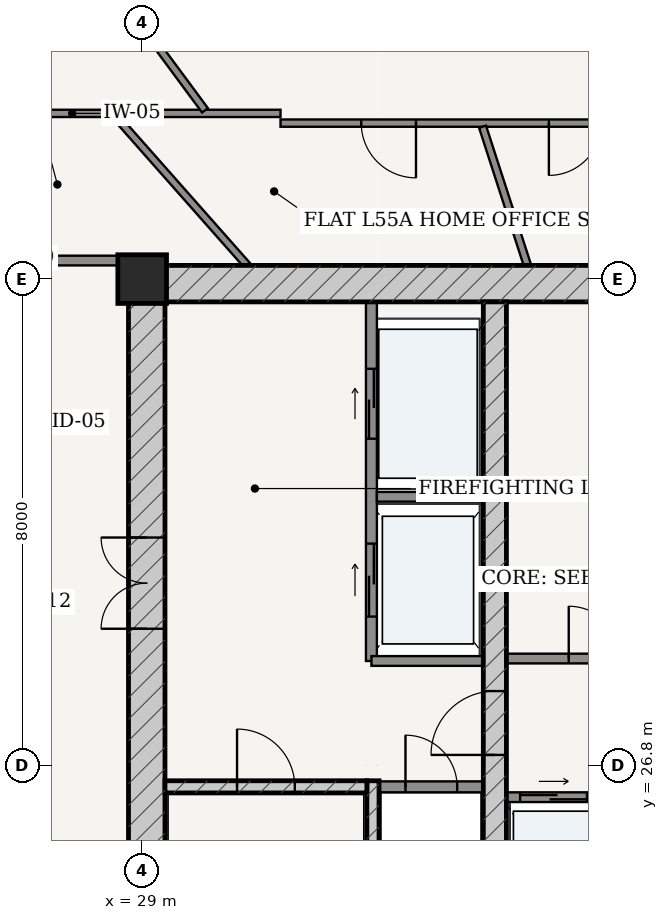
"""IFC4 building model, lengths in metres.
Left out: names, types, materials, properties, quantities, classifications, styles, units other than length and angle.
Written with IfcOpenShell. Run it as: python <this file> out.ifc"""

import sys

from ifc_helpers import new_model, si_unit, direction, frame, frame_2d, origin, origin_2d, place, context, subcontext, project, spatial, rectangle, extrude, source, transform, mapped, element, fill, save


model = new_model("IFC4")
c1 = context("Model", 3, precision=1e-05, world=origin(), true_north=direction((-0.2419218956, 0.970295726276)))
c2 = subcontext(c1, "Body", "Model", "MODEL_VIEW")
j1 = project(units=[si_unit("LENGTHUNIT", "METRE"), si_unit("PLANEANGLEUNIT", "RADIAN")], contexts=[c1])
p1 = place(None, origin())
s1 = spatial("IfcSite", under=j1, at=p1, CompositionType="ELEMENT")
p2 = place(p1, origin())
s2 = spatial("IfcBuilding", under=s1, at=p2, CompositionType="ELEMENT")
p3 = place(p2, frame((0.0, 0.0, 209.7)))
s3 = spatial("IfcBuildingStorey", under=s2, at=p3, CompositionType="ELEMENT", Elevation=209.7)
p4 = place(p3, frame((29.0, 34.8, 0.0), z_axis=(0.0, 0.0, 1.0), x_axis=(1.0, 0.0, 0.0)))
e1 = element("IfcColumn", 1, at=p4, inside=s3, PredefinedType="COLUMN", context=c2, shape_type="SweptSolid", body=[
    extrude(rectangle(XDim=0.8, YDim=0.8, at=origin_2d()), origin(), (0.0, 0.0, 1.0), 3.7),
])
p5 = place(p3, frame((28.775, 34.725, 0.0), z_axis=(0.0, 0.0, 1.0), x_axis=(1.0, 0.0, 0.0)))
e2 = element("IfcWall", 2, at=p5, inside=s3, PredefinedType="SHEAR", context=c2, shape_type="SweptSolid", body=[
    extrude(rectangle(XDim=18.45, YDim=0.6, at=frame_2d((9.225, 0.0))), origin(), (0.0, 0.0, 1.0), 3.435),
])
p6 = place(p3, frame((29.075, 19.175, 0.0), z_axis=(0.0, 0.0, 1.0), x_axis=(0.0, 1.0, 0.0)))
e3 = element("IfcWall", 3, at=p6, inside=s3, PredefinedType="SHEAR", context=c2, shape_type="SweptSolid", body=[
    extrude(rectangle(XDim=15.25, YDim=0.6, at=frame_2d((7.625, 0.0))), origin(), (0.0, 0.0, 1.0), 3.435),
])
p7 = place(p6, frame((9.875, 0.0, 0.0)))
e4 = element("IfcOpeningElement", 4, at=p7, cuts=e3, PredefinedType="OPENING", context=c2, shape_type="SweptSolid", body=[
    extrude(rectangle(XDim=1.5, YDim=2.2, at=frame_2d((0.75, 1.1))), frame((0.0, 0.31, 0.0), z_axis=(0.0, -1.0, 0.0), x_axis=(1.0, 0.0, 0.0)), (0.0, 0.0, 1.0), 0.62),
])
p8 = place(p3, frame((32.795, 19.175, 0.0), z_axis=(0.0, 0.0, 1.0), x_axis=(0.0, 1.0, 0.0)))
e5 = element("IfcWall", 5, at=p8, inside=s3, PredefinedType="SOLIDWALL", context=c2, shape_type="SweptSolid", body=[
    extrude(rectangle(XDim=7.375, YDim=0.2, at=frame_2d((3.688, 0.0))), origin(), (0.0, 0.0, 1.0), 3.435),
])
p9 = place(p3, frame((29.375, 26.45, 0.0), z_axis=(0.0, 0.0, 1.0), x_axis=(1.0, 0.0, 0.0)))
e6 = element("IfcWall", 6, at=p9, inside=s3, PredefinedType="SOLIDWALL", context=c2, shape_type="SweptSolid", body=[
    extrude(rectangle(XDim=3.32, YDim=0.2, at=frame_2d((1.66, 0.0))), origin(), (0.0, 0.0, 1.0), 3.435),
])
p10 = place(p9, frame((1.185, 0.0, 0.0)))
e7 = element("IfcOpeningElement", 7, at=p10, cuts=e6, PredefinedType="OPENING", context=c2, shape_type="SweptSolid", body=[
    extrude(rectangle(XDim=0.95, YDim=2.15, at=frame_2d((0.475, 1.075))), frame((0.0, 0.11, 0.0), z_axis=(0.0, -1.0, 0.0), x_axis=(1.0, 0.0, 0.0)), (0.0, 0.0, 1.0), 0.22),
])
p11 = place(p3, frame((34.8, 19.175, 0.0), z_axis=(0.0, 0.0, 1.0), x_axis=(0.0, 1.0, 0.0)))
e8 = element("IfcWall", 8, at=p11, inside=s3, PredefinedType="SHEAR", context=c2, shape_type="SweptSolid", body=[
    extrude(rectangle(XDim=15.25, YDim=0.38, at=frame_2d((7.625, 0.0))), origin(), (0.0, 0.0, 1.0), 3.435),
])
p12 = place(p11, frame((7.8, 0.0, 0.0)))
e9 = element("IfcOpeningElement", 9, at=p12, cuts=e8, PredefinedType="OPENING", context=c2, shape_type="SweptSolid", body=[
    extrude(rectangle(XDim=1.05, YDim=2.15, at=frame_2d((0.525, 1.075))), frame((0.0, 0.2, 0.0), z_axis=(0.0, -1.0, 0.0), x_axis=(1.0, 0.0, 0.0)), (0.0, 0.0, 1.0), 0.4),
])
p13 = place(p3, frame((32.9, 26.45, 0.0), z_axis=(0.0, 0.0, 1.0), x_axis=(1.0, 0.0, 0.0)))
e10 = element("IfcWall", 10, at=p13, inside=s3, PredefinedType="PARTITIONING", context=c2, shape_type="SweptSolid", body=[
    extrude(rectangle(XDim=1.71, YDim=0.18, at=frame_2d((0.855, 0.0))), origin(), (0.0, 0.0, 1.0), 3.435),
])
p14 = place(p13, frame((0.43, 0.0, 0.0)))
e11 = element("IfcOpeningElement", 11, at=p14, cuts=e10, PredefinedType="OPENING", context=c2, shape_type="SweptSolid", body=[
    extrude(rectangle(XDim=0.85, YDim=2.1, at=frame_2d((0.425, 1.05))), frame((0.0, 0.1, 0.0), z_axis=(0.0, -1.0, 0.0), x_axis=(1.0, 0.0, 0.0)), (0.0, 0.0, 1.0), 0.2),
])
p15 = place(p3, frame((32.77, 28.52, 0.0), z_axis=(0.0, 0.0, 1.0), x_axis=(0.0, 1.0, 0.0)))
e12 = element("IfcWall", 12, at=p15, inside=s3, PredefinedType="PARTITIONING", context=c2, shape_type="SweptSolid", body=[
    extrude(rectangle(XDim=5.905, YDim=0.18, at=frame_2d((2.953, 0.0))), origin(), (0.0, 0.0, 1.0), 3.435),
])
p16 = place(p15, frame((3.655, 0.0, 0.0)))
e13 = element("IfcOpeningElement", 13, at=p16, cuts=e12, PredefinedType="OPENING", context=c2, shape_type="SweptSolid", body=[
    extrude(rectangle(XDim=1.15, YDim=2.2, at=frame_2d((0.575, 1.1))), frame((0.0, 0.1, 0.0), z_axis=(0.0, -1.0, 0.0), x_axis=(1.0, 0.0, 0.0)), (0.0, 0.0, 1.0), 0.2),
])
p17 = place(p15, frame((0.73, 0.0, 0.0)))
e14 = element("IfcOpeningElement", 14, at=p17, cuts=e12, PredefinedType="OPENING", context=c2, shape_type="SweptSolid", body=[
    extrude(rectangle(XDim=1.2, YDim=2.25, at=frame_2d((0.6, 1.125))), frame((0.0, 0.1, 0.0), z_axis=(0.0, -1.0, 0.0), x_axis=(1.0, 0.0, 0.0)), (0.0, 0.0, 1.0), 0.2),
])
p18 = place(p3, frame((32.86, 31.22, 0.0), z_axis=(0.0, 0.0, 1.0), x_axis=(1.0, 0.0, 0.0)))
e15 = element("IfcWall", 15, at=p18, inside=s3, PredefinedType="PARTITIONING", context=c2, shape_type="SweptSolid", body=[
    extrude(rectangle(XDim=1.75, YDim=0.16, at=frame_2d((0.875, 0.0))), origin(), (0.0, 0.0, 1.0), 3.435),
])
p19 = place(p3, frame((32.77, 28.52, 0.0), z_axis=(0.0, 0.0, 1.0), x_axis=(1.0, 0.0, 0.0)))
e16 = element("IfcWall", 16, at=p19, inside=s3, PredefinedType="PARTITIONING", context=c2, shape_type="SweptSolid", body=[
    extrude(rectangle(XDim=1.84, YDim=0.16, at=frame_2d((0.92, 0.0))), origin(), (0.0, 0.0, 1.0), 3.435),
])
p20 = place(p3, frame((34.99, 28.56, 0.0), z_axis=(0.0, 0.0, 1.0), x_axis=(1.0, 0.0, 0.0)))
e17 = element("IfcWall", 17, at=p20, inside=s3, PredefinedType="PARTITIONING", context=c2, shape_type="SweptSolid", body=[
    extrude(rectangle(XDim=6.02, YDim=0.16, at=frame_2d((3.01, 0.0))), origin(), (0.0, 0.0, 1.0), 3.435),
])
p21 = place(p20, frame((1.025, 0.0, 0.0)))
e18 = element("IfcOpeningElement", 18, at=p21, cuts=e17, PredefinedType="OPENING", context=c2, shape_type="SweptSolid", body=[
    extrude(rectangle(XDim=0.86, YDim=2.1, at=frame_2d((0.43, 1.05))), frame((0.0, 0.09, 0.0), z_axis=(0.0, -1.0, 0.0), x_axis=(1.0, 0.0, 0.0)), (0.0, 0.0, 1.0), 0.18),
])
p22 = place(p20, frame((4.14, 0.0, 0.0)))
e19 = element("IfcOpeningElement", 19, at=p22, cuts=e17, PredefinedType="OPENING", context=c2, shape_type="SweptSolid", body=[
    extrude(rectangle(XDim=0.85, YDim=2.1, at=frame_2d((0.425, 1.05))), frame((0.0, 0.09, 0.0), z_axis=(0.0, -1.0, 0.0), x_axis=(1.0, 0.0, 0.0)), (0.0, 0.0, 1.0), 0.18),
])
p23 = place(p3, frame((34.99, 26.28, 0.0), z_axis=(0.0, 0.0, 1.0), x_axis=(1.0, 0.0, 0.0)))
e20 = element("IfcWall", 20, at=p23, inside=s3, PredefinedType="PARTITIONING", context=c2, shape_type="SweptSolid", body=[
    extrude(rectangle(XDim=6.02, YDim=0.16, at=frame_2d((3.01, 0.0))), origin(), (0.0, 0.0, 1.0), 3.435),
])
p24 = place(p23, frame((0.225, 0.0, 0.0)))
e21 = element("IfcOpeningElement", 21, at=p24, cuts=e20, PredefinedType="OPENING", context=c2, shape_type="SweptSolid", body=[
    extrude(rectangle(XDim=1.1, YDim=2.2, at=frame_2d((0.55, 1.1))), frame((0.0, 0.09, 0.0), z_axis=(0.0, -1.0, 0.0), x_axis=(1.0, 0.0, 0.0)), (0.0, 0.0, 1.0), 0.18),
])
p25 = place(p23, frame((1.705, 0.0, 0.0)))
e22 = element("IfcOpeningElement", 22, at=p25, cuts=e20, PredefinedType="OPENING", context=c2, shape_type="SweptSolid", body=[
    extrude(rectangle(XDim=1.1, YDim=2.2, at=frame_2d((0.55, 1.1))), frame((0.0, 0.09, 0.0), z_axis=(0.0, -1.0, 0.0), x_axis=(1.0, 0.0, 0.0)), (0.0, 0.0, 1.0), 0.18),
])
p26 = place(p3, frame((26.845, 35.105, 0.0), z_axis=(0.0, 0.0, 1.0), x_axis=(1.0, 0.0, 0.0)))
e23 = element("IfcWall", 23, at=p26, inside=s3, PredefinedType="PARTITIONING", context=c2, shape_type="SweptSolid", body=[
    extrude(rectangle(XDim=1.93, YDim=0.16, at=frame_2d((0.965, 0.0))), origin(), (0.0, 0.0, 1.0), 3.435),
])
p27 = place(p3, frame((24.425, 37.525, 0.0), z_axis=(0.0, 0.0, 1.0), x_axis=(1.0, 0.0, 0.0)))
e24 = element("IfcWall", 24, at=p27, inside=s3, PredefinedType="PARTITIONING", context=c2, shape_type="SweptSolid", body=[
    extrude(rectangle(XDim=6.85, YDim=0.12, at=frame_2d((3.425, 0.0))), origin(), (0.0, 0.0, 1.0), 2.951),
])
p28 = place(p3, frame((31.275, 37.365, 0.0), z_axis=(0.0, 0.0, 1.0), x_axis=(1.0, 0.0, 0.0)))
e25 = element("IfcWall", 25, at=p28, inside=s3, PredefinedType="PARTITIONING", context=c2, shape_type="SweptSolid", body=[
    extrude(rectangle(XDim=6.623, YDim=0.12, at=frame_2d((3.312, 0.0))), origin(), (0.0, 0.0, 1.0), 2.951),
])
p29 = place(p28, frame((4.413, 0.0, 0.0)))
e26 = element("IfcOpeningElement", 26, at=p29, cuts=e25, PredefinedType="OPENING", context=c2, shape_type="SweptSolid", body=[
    extrude(rectangle(XDim=0.86, YDim=2.15, at=frame_2d((0.43, 1.075))), frame((0.0, 0.07, 0.0), z_axis=(0.0, -1.0, 0.0), x_axis=(1.0, 0.0, 0.0)), (0.0, 0.0, 1.0), 0.14),
])
p30 = place(p28, frame((1.328, 0.0, 0.0)))
e27 = element("IfcOpeningElement", 27, at=p30, cuts=e25, PredefinedType="OPENING", context=c2, shape_type="SweptSolid", body=[
    extrude(rectangle(XDim=0.9, YDim=2.15, at=frame_2d((0.45, 1.075))), frame((0.0, 0.07, 0.0), z_axis=(0.0, -1.0, 0.0), x_axis=(1.0, 0.0, 0.0)), (0.0, 0.0, 1.0), 0.14),
])
p31 = place(p3, frame((30.033, 37.575, 0.0), z_axis=(0.0, 0.0, 1.0), x_axis=(-0.59452500855, 0.804077119565, 0.0)))
e28 = element("IfcWall", 28, at=p31, inside=s3, PredefinedType="PARTITIONING", context=c2, shape_type="SweptSolid", body=[
    extrude(rectangle(XDim=6.867, YDim=0.12, at=frame_2d((3.434, 0.0))), origin(), (0.0, 0.0, 1.0), 2.951),
])
p32 = place(p31, frame((1.976, 0.0, 0.0)))
e29 = element("IfcOpeningElement", 29, at=p32, cuts=e28, PredefinedType="OPENING", context=c2, shape_type="SweptSolid", body=[
    extrude(rectangle(XDim=0.9, YDim=2.15, at=frame_2d((0.45, 1.075))), frame((0.0, 0.07, 0.0), z_axis=(0.0, -1.0, 0.0), x_axis=(1.0, 0.0, 0.0)), (0.0, 0.0, 1.0), 0.14),
])
p33 = place(p3, frame((35.336, 35.027, 0.0), z_axis=(0.0, 0.0, 1.0), x_axis=(-0.308083476138, 0.951359328398, 0.0)))
e30 = element("IfcWall", 30, at=p33, inside=s3, PredefinedType="PARTITIONING", context=c2, shape_type="SweptSolid", body=[
    extrude(rectangle(XDim=2.396, YDim=0.12, at=frame_2d((1.198, 0.0))), origin(), (0.0, 0.0, 1.0), 2.52),
])
p34 = place(p3, frame((30.726, 35.027, 0.0), z_axis=(0.0, 0.0, 1.0), x_axis=(-0.662398427862, 0.749151735475, 0.0)))
e31 = element("IfcWall", 31, at=p34, inside=s3, PredefinedType="PARTITIONING", context=c2, shape_type="SweptSolid", body=[
    extrude(rectangle(XDim=3.273, YDim=0.12, at=frame_2d((1.636, 0.0))), origin(), (0.0, 0.0, 1.0), 3.435),
])
m1 = source(origin(), c2, "Body", "SweptSolid", [
    extrude(rectangle(XDim=1.5, YDim=2.2, at=frame_2d((0.75, 1.1))), frame((0.0, 0.025, 0.0), z_axis=(0.0, -1.0, 0.0), x_axis=(1.0, 0.0, 0.0)), (0.0, 0.0, 1.0), 0.05),
])
p35 = place(p7, origin())
e32 = element("IfcDoor", 32, at=p35, inside=s3, OperationType="DOUBLE_DOOR_SINGLE_SWING", PredefinedType="DOOR", context=c2, shape_type="MappedRepresentation", body=[
    mapped(m1, transform((0.0, 0.0, 0.0), scale=1.0)),
])
fill(e4, e32)
m2 = source(origin(), c2, "Body", "SweptSolid", [
    extrude(rectangle(XDim=1.05, YDim=2.15, at=frame_2d((0.525, 1.075))), frame((0.0, 0.025, 0.0), z_axis=(0.0, -1.0, 0.0), x_axis=(1.0, 0.0, 0.0)), (0.0, 0.0, 1.0), 0.05),
])
p36 = place(p12, origin())
e33 = element("IfcDoor", 33, at=p36, inside=s3, OperationType="SINGLE_SWING_LEFT", PredefinedType="DOOR", context=c2, shape_type="MappedRepresentation", body=[
    mapped(m2, transform((0.0, 0.0, 0.0), scale=1.0)),
])
fill(e9, e33)
m3 = source(origin(), c2, "Body", "SweptSolid", [
    extrude(rectangle(XDim=0.95, YDim=2.15, at=frame_2d((0.475, 1.075))), frame((0.0, 0.025, 0.0), z_axis=(0.0, -1.0, 0.0), x_axis=(1.0, 0.0, 0.0)), (0.0, 0.0, 1.0), 0.05),
])
p37 = place(p10, origin())
e34 = element("IfcDoor", 34, at=p37, inside=s3, OperationType="SINGLE_SWING_LEFT", PredefinedType="DOOR", context=c2, shape_type="MappedRepresentation", body=[
    mapped(m3, transform((0.0, 0.0, 0.0), scale=1.0)),
])
fill(e7, e34)
m4 = source(origin(), c2, "Body", "SweptSolid", [
    extrude(rectangle(XDim=0.85, YDim=2.1, at=frame_2d((0.425, 1.05))), frame((0.0, 0.025, 0.0), z_axis=(0.0, -1.0, 0.0), x_axis=(1.0, 0.0, 0.0)), (0.0, 0.0, 1.0), 0.05),
])
p38 = place(p14, origin())
e35 = element("IfcDoor", 35, at=p38, inside=s3, OperationType="SINGLE_SWING_LEFT", PredefinedType="DOOR", context=c2, shape_type="MappedRepresentation", body=[
    mapped(m4, transform((0.0, 0.0, 0.0), scale=1.0)),
])
fill(e11, e35)
m5 = source(origin(), c2, "Body", "SweptSolid", [
    extrude(rectangle(XDim=0.86, YDim=2.1, at=frame_2d((0.43, 1.05))), frame((0.0, 0.025, 0.0), z_axis=(0.0, -1.0, 0.0), x_axis=(1.0, 0.0, 0.0)), (0.0, 0.0, 1.0), 0.05),
])
p39 = place(p21, origin())
e36 = element("IfcDoor", 36, at=p39, inside=s3, OperationType="SINGLE_SWING_LEFT", PredefinedType="DOOR", context=c2, shape_type="MappedRepresentation", body=[
    mapped(m5, transform((0.0, 0.0, 0.0), scale=1.0)),
])
fill(e18, e36)
m6 = source(origin(), c2, "Body", "SweptSolid", [
    extrude(rectangle(XDim=1.15, YDim=2.2, at=frame_2d((0.575, 1.1))), frame((0.0, 0.025, 0.0), z_axis=(0.0, -1.0, 0.0), x_axis=(1.0, 0.0, 0.0)), (0.0, 0.0, 1.0), 0.05),
])
p40 = place(p16, origin())
e37 = element("IfcDoor", 37, at=p40, inside=s3, OperationType="DOUBLE_DOOR_SLIDING", PredefinedType="DOOR", context=c2, shape_type="MappedRepresentation", body=[
    mapped(m6, transform((0.0, 0.0, 0.0), scale=1.0)),
])
fill(e13, e37)
m7 = source(origin(), c2, "Body", "SweptSolid", [
    extrude(rectangle(XDim=1.2, YDim=2.25, at=frame_2d((0.6, 1.125))), frame((0.0, 0.025, 0.0), z_axis=(0.0, -1.0, 0.0), x_axis=(1.0, 0.0, 0.0)), (0.0, 0.0, 1.0), 0.05),
])
p41 = place(p17, origin())
e38 = element("IfcDoor", 38, at=p41, inside=s3, OperationType="DOUBLE_DOOR_SLIDING", PredefinedType="DOOR", context=c2, shape_type="MappedRepresentation", body=[
    mapped(m7, transform((0.0, 0.0, 0.0), scale=1.0)),
])
fill(e14, e38)
m8 = source(origin(), c2, "Body", "SweptSolid", [
    extrude(rectangle(XDim=1.1, YDim=2.2, at=frame_2d((0.55, 1.1))), frame((0.0, 0.025, 0.0), z_axis=(0.0, -1.0, 0.0), x_axis=(1.0, 0.0, 0.0)), (0.0, 0.0, 1.0), 0.05),
])
p42 = place(p24, origin())
e39 = element("IfcDoor", 39, at=p42, inside=s3, OperationType="DOUBLE_DOOR_SLIDING", PredefinedType="DOOR", context=c2, shape_type="MappedRepresentation", body=[
    mapped(m8, transform((0.0, 0.0, 0.0), scale=1.0)),
])
fill(e21, e39)
m9 = source(origin(), c2, "Body", "SweptSolid", [
    extrude(rectangle(XDim=0.86, YDim=2.15, at=frame_2d((0.43, 1.075))), frame((0.0, 0.025, 0.0), z_axis=(0.0, -1.0, 0.0), x_axis=(1.0, 0.0, 0.0)), (0.0, 0.0, 1.0), 0.05),
])
p43 = place(p29, frame((0.86, 0.0, 0.0), z_axis=(0.0, 0.0, 1.0), x_axis=(-1.0, 0.0, 0.0)))
e40 = element("IfcDoor", 40, at=p43, inside=s3, OperationType="SINGLE_SWING_RIGHT", PredefinedType="DOOR", context=c2, shape_type="MappedRepresentation", body=[
    mapped(m9, transform((0.0, 0.0, 0.0), scale=1.0)),
])
fill(e26, e40)
m10 = source(origin(), c2, "Body", "SweptSolid", [
    extrude(rectangle(XDim=0.9, YDim=2.15, at=frame_2d((0.45, 1.075))), frame((0.0, 0.025, 0.0), z_axis=(0.0, -1.0, 0.0), x_axis=(1.0, 0.0, 0.0)), (0.0, 0.0, 1.0), 0.05),
])
p44 = place(p30, frame((0.9, 0.0, 0.0), z_axis=(0.0, 0.0, 1.0), x_axis=(-1.0, 0.0, 0.0)))
e41 = element("IfcDoor", 41, at=p44, inside=s3, OperationType="SINGLE_SWING_LEFT", PredefinedType="DOOR", context=c2, shape_type="MappedRepresentation", body=[
    mapped(m10, transform((0.0, 0.0, 0.0), scale=1.0)),
])
fill(e27, e41)
save(model, sys.argv[1])
